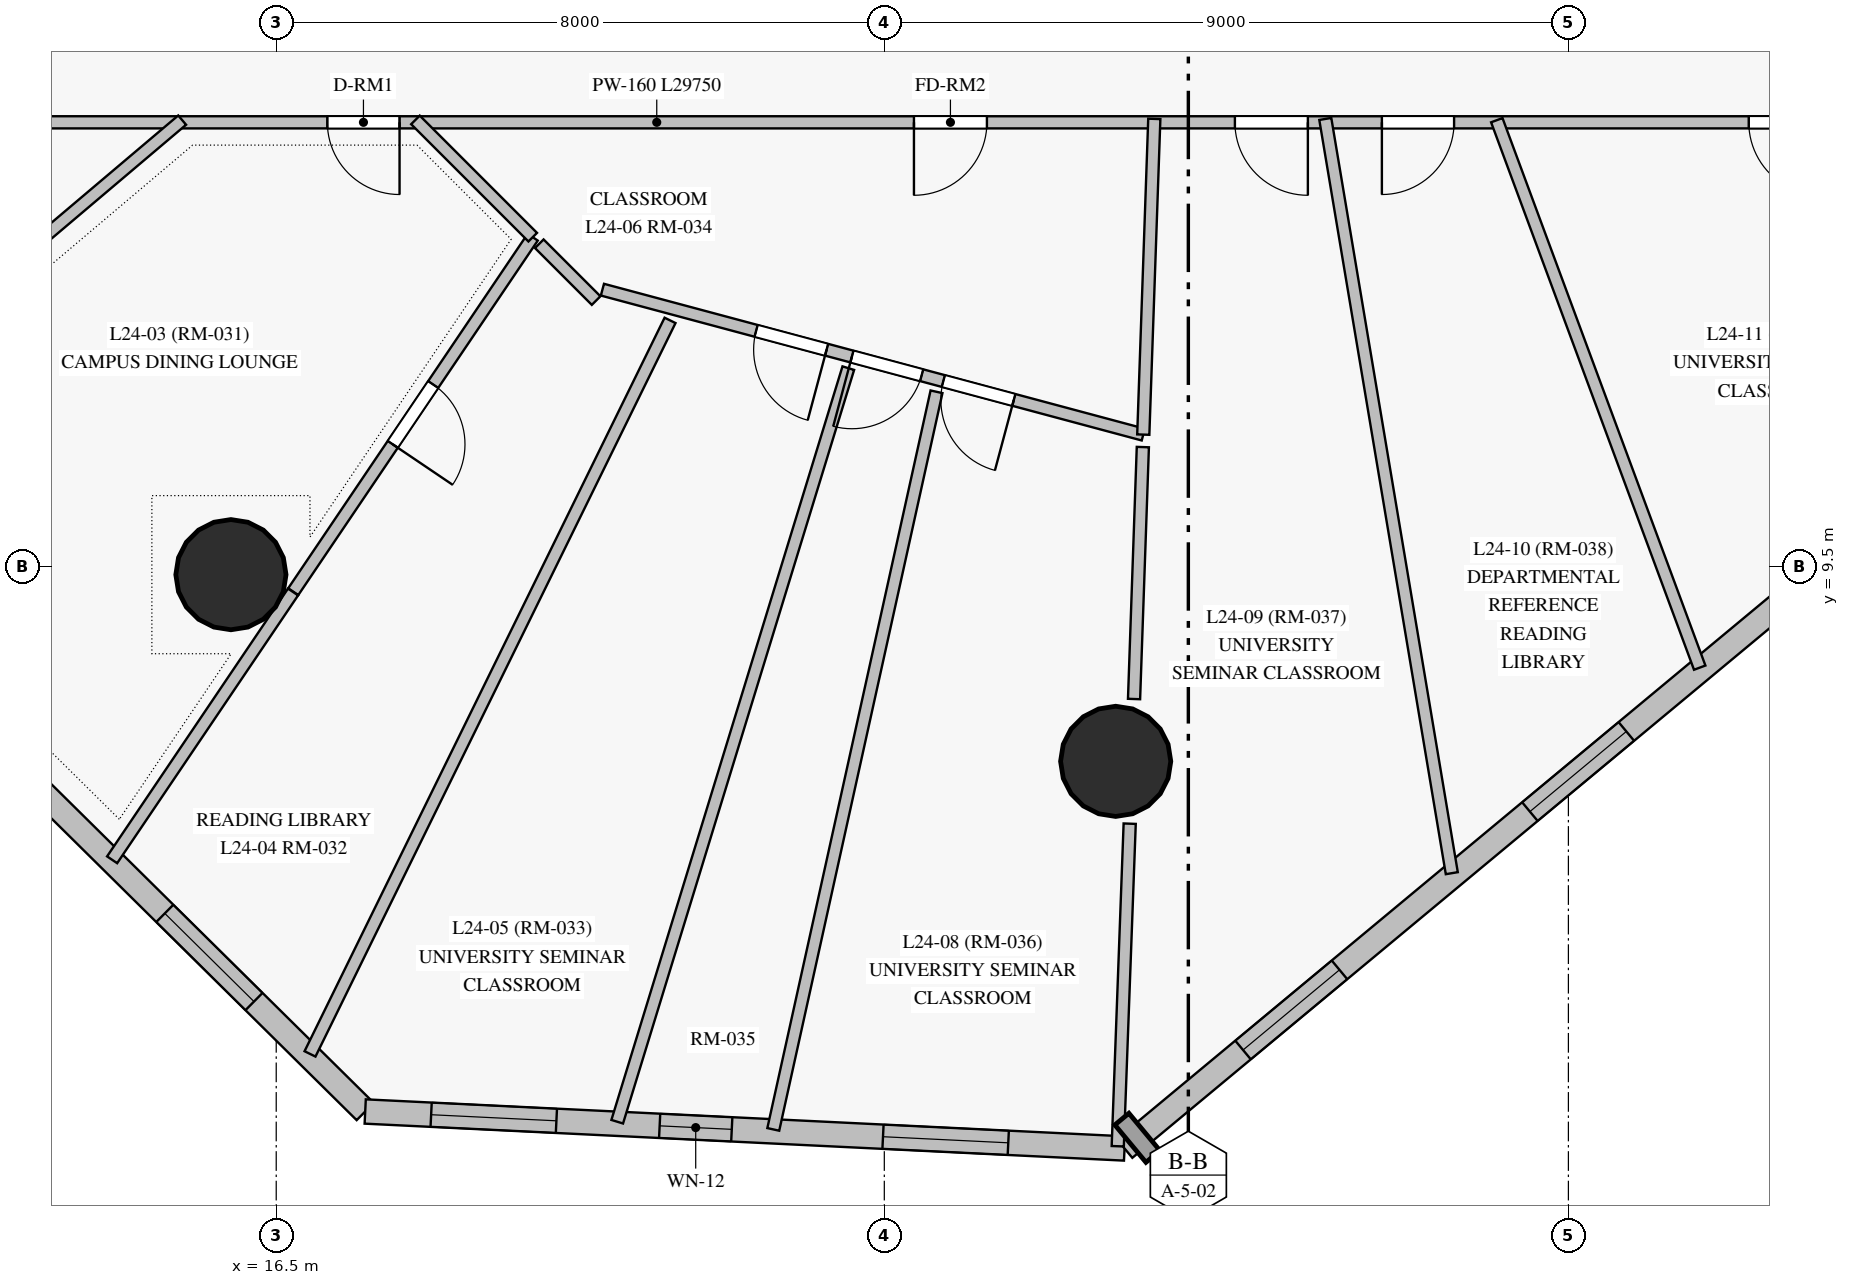
"""IFC4 building model, lengths in metres.
Left out: names, types, materials, properties, quantities, classifications, styles, units other than length and angle.
Written with IfcOpenShell. Run it as: python <this file> out.ifc"""

import sys

from ifc_helpers import new_model, si_unit, direction, frame, frame_2d, origin, origin_with_axes, origin_2d, place, context, subcontext, project, spatial, rectangle, circle, extrude, source, transform, mapped, element, fill, save


model = new_model("IFC4")
c1 = context("Model", 3, precision=1e-05, world=origin(), true_north=direction((0.0, 1.0)))
c2 = subcontext(c1, "Body", "Model", "MODEL_VIEW")
j1 = project(units=[si_unit("LENGTHUNIT", "METRE"), si_unit("PLANEANGLEUNIT", "RADIAN")], contexts=[c1])
p1 = place(None, origin())
s1 = spatial("IfcSite", under=j1, at=p1, CompositionType="ELEMENT")
p2 = place(p1, origin())
s2 = spatial("IfcBuilding", under=s1, at=p2, CompositionType="ELEMENT")
p3 = place(p2, frame((0.0, 0.0, 92.2)))
s3 = spatial("IfcBuildingStorey", under=s2, at=p3, CompositionType="ELEMENT", Elevation=92.2)
m1 = source(origin_with_axes(), c2, "Body", "SweptSolid", [
    extrude(circle(Radius=0.725, at=origin_2d()), origin(), (0.0, 0.0, 1.0), 4.0),
])
for number, where, z_axis, x_axis in (
    (1, (15.904, 9.399, 0.0), (0.0, 0.0, 1.0), (1.0, 0.0, 0.0)),
    (2, (27.544, 6.943, 0.0), (0.0, 0.0, 1.0), (1.0, 0.0, 0.0)),
):
    element("IfcColumn", number, at=place(p3, frame(where, z_axis=z_axis, x_axis=x_axis)), inside=s3, PredefinedType="COLUMN", context=c2, shape_type="MappedRepresentation", body=[
        mapped(m1, transform((0.0, 0.0, 0.0), scale=1.0)),
    ])
p4 = place(p3, frame((8.8, 11.106, 0.0), z_axis=(0.0, 0.0, 1.0), x_axis=(0.711166138023, -0.703023985459, 0.0)))
e3 = element("IfcWall", 3, at=p4, inside=s3, PredefinedType="SOLIDWALL", context=c2, shape_type="SweptSolid", body=[
    extrude(rectangle(XDim=12.474, YDim=0.32, at=frame_2d((6.237, 0.0))), origin(), (0.0, 0.0, 1.0), 3.775),
])
p5 = place(p4, frame((3.52, 0.0, 0.85)))
e4 = element("IfcOpeningElement", 4, at=p5, cuts=e3, PredefinedType="OPENING", context=c2, shape_type="SweptSolid", body=[
    extrude(rectangle(XDim=1.65, YDim=1.65, at=frame_2d((0.825, 0.825))), frame((0.0, 0.17, 0.0), z_axis=(0.0, -1.0, 0.0), x_axis=(1.0, 0.0, 0.0)), (0.0, 0.0, 1.0), 0.34),
])
p6 = place(p4, frame((8.766, 0.0, 0.85)))
e5 = element("IfcOpeningElement", 5, at=p6, cuts=e3, PredefinedType="OPENING", context=c2, shape_type="SweptSolid", body=[
    extrude(rectangle(XDim=1.65, YDim=1.65, at=frame_2d((0.825, 0.825))), frame((0.0, 0.17, 0.0), z_axis=(0.0, -1.0, 0.0), x_axis=(1.0, 0.0, 0.0)), (0.0, 0.0, 1.0), 0.34),
])
p7 = place(p3, frame((17.671, 2.336, 0.0), z_axis=(0.0, 0.0, 1.0), x_axis=(0.998817213459, -0.048622773441, 0.0)))
e6 = element("IfcWall", 6, at=p7, inside=s3, PredefinedType="SOLIDWALL", context=c2, shape_type="SweptSolid", body=[
    extrude(rectangle(XDim=10.002, YDim=0.32, at=frame_2d((5.001, 0.0))), origin(), (0.0, 0.0, 1.0), 3.775),
])
p8 = place(p7, frame((0.868, 0.0, 0.85)))
e7 = element("IfcOpeningElement", 7, at=p8, cuts=e6, PredefinedType="OPENING", context=c2, shape_type="SweptSolid", body=[
    extrude(rectangle(XDim=1.65, YDim=1.65, at=frame_2d((0.825, 0.825))), frame((0.0, 0.17, 0.0), z_axis=(0.0, -1.0, 0.0), x_axis=(1.0, 0.0, 0.0)), (0.0, 0.0, 1.0), 0.34),
])
p9 = place(p7, frame((3.878, 0.0, 0.85)))
e8 = element("IfcOpeningElement", 8, at=p9, cuts=e6, PredefinedType="OPENING", context=c2, shape_type="SweptSolid", body=[
    extrude(rectangle(XDim=0.95, YDim=1.5, at=frame_2d((0.475, 0.75))), frame((0.0, 0.17, 0.0), z_axis=(0.0, -1.0, 0.0), x_axis=(1.0, 0.0, 0.0)), (0.0, 0.0, 1.0), 0.34),
])
p10 = place(p7, frame((6.82, 0.0, 0.85)))
e9 = element("IfcOpeningElement", 9, at=p10, cuts=e6, PredefinedType="OPENING", context=c2, shape_type="SweptSolid", body=[
    extrude(rectangle(XDim=1.65, YDim=1.65, at=frame_2d((0.825, 0.825))), frame((0.0, 0.17, 0.0), z_axis=(0.0, -1.0, 0.0), x_axis=(1.0, 0.0, 0.0)), (0.0, 0.0, 1.0), 0.34),
])
p11 = place(p3, frame((27.661, 1.85, 0.0), z_axis=(0.0, 0.0, 1.0), x_axis=(0.769079412442, 0.639153234646, 0.0)))
e10 = element("IfcWall", 10, at=p11, inside=s3, PredefinedType="SOLIDWALL", context=c2, shape_type="SweptSolid", body=[
    extrude(rectangle(XDim=14.959, YDim=0.32, at=frame_2d((7.479, 0.0))), origin(), (0.0, 0.0, 1.0), 3.775),
])
p12 = place(p11, frame((2.027, 0.0, 0.85)))
e11 = element("IfcOpeningElement", 11, at=p12, cuts=e10, PredefinedType="OPENING", context=c2, shape_type="SweptSolid", body=[
    extrude(rectangle(XDim=1.65, YDim=1.65, at=frame_2d((0.825, 0.825))), frame((0.0, 0.17, 0.0), z_axis=(0.0, -1.0, 0.0), x_axis=(1.0, 0.0, 0.0)), (0.0, 0.0, 1.0), 0.34),
])
p13 = place(p11, frame((6.934, 0.0, 0.85)))
e12 = element("IfcOpeningElement", 12, at=p13, cuts=e10, PredefinedType="OPENING", context=c2, shape_type="SweptSolid", body=[
    extrude(rectangle(XDim=1.65, YDim=1.65, at=frame_2d((0.825, 0.825))), frame((0.0, 0.17, 0.0), z_axis=(0.0, -1.0, 0.0), x_axis=(1.0, 0.0, 0.0)), (0.0, 0.0, 1.0), 0.34),
])
p14 = place(p11, frame((11.562, 0.0, 0.85)))
e13 = element("IfcOpeningElement", 13, at=p14, cuts=e10, PredefinedType="OPENING", context=c2, shape_type="SweptSolid", body=[
    extrude(rectangle(XDim=1.65, YDim=1.65, at=frame_2d((0.825, 0.825))), frame((0.0, 0.17, 0.0), z_axis=(0.0, -1.0, 0.0), x_axis=(1.0, 0.0, 0.0)), (0.0, 0.0, 1.0), 0.34),
])
p15 = place(p3, frame((40.25, 15.35, 0.0), z_axis=(0.0, 0.0, 1.0), x_axis=(-1.0, 0.0, 0.0)))
e14 = element("IfcWall", 14, at=p15, inside=s3, PredefinedType="PARTITIONING", context=c2, shape_type="SweptSolid", body=[
    extrude(rectangle(XDim=29.75, YDim=0.16, at=frame_2d((14.875, 0.0))), origin(), (0.0, 0.0, 1.0), 2.975),
])
p16 = place(p15, frame((22.127, 0.0, 0.0)))
e15 = element("IfcOpeningElement", 15, at=p16, cuts=e14, PredefinedType="OPENING", context=c2, shape_type="SweptSolid", body=[
    extrude(rectangle(XDim=0.95, YDim=2.15, at=frame_2d((0.475, 1.075))), frame((0.0, 0.09, 0.0), z_axis=(0.0, -1.0, 0.0), x_axis=(1.0, 0.0, 0.0)), (0.0, 0.0, 1.0), 0.18),
])
p17 = place(p15, frame((14.4, 0.0, 0.0)))
e16 = element("IfcOpeningElement", 16, at=p17, cuts=e14, PredefinedType="OPENING", context=c2, shape_type="SweptSolid", body=[
    extrude(rectangle(XDim=0.96, YDim=2.15, at=frame_2d((0.48, 1.075))), frame((0.0, 0.09, 0.0), z_axis=(0.0, -1.0, 0.0), x_axis=(1.0, 0.0, 0.0)), (0.0, 0.0, 1.0), 0.18),
])
p18 = place(p15, frame((10.177, 0.0, 0.0)))
e17 = element("IfcOpeningElement", 17, at=p18, cuts=e14, PredefinedType="OPENING", context=c2, shape_type="SweptSolid", body=[
    extrude(rectangle(XDim=0.96, YDim=2.15, at=frame_2d((0.48, 1.075))), frame((0.0, 0.09, 0.0), z_axis=(0.0, -1.0, 0.0), x_axis=(1.0, 0.0, 0.0)), (0.0, 0.0, 1.0), 0.18),
])
p19 = place(p15, frame((8.254, 0.0, 0.0)))
e18 = element("IfcOpeningElement", 18, at=p19, cuts=e14, PredefinedType="OPENING", context=c2, shape_type="SweptSolid", body=[
    extrude(rectangle(XDim=0.95, YDim=2.15, at=frame_2d((0.475, 1.075))), frame((0.0, 0.09, 0.0), z_axis=(0.0, -1.0, 0.0), x_axis=(1.0, 0.0, 0.0)), (0.0, 0.0, 1.0), 0.18),
])
p20 = place(p15, frame((3.417, 0.0, 0.0)))
e19 = element("IfcOpeningElement", 19, at=p20, cuts=e14, PredefinedType="OPENING", context=c2, shape_type="SweptSolid", body=[
    extrude(rectangle(XDim=0.96, YDim=2.15, at=frame_2d((0.48, 1.075))), frame((0.0, 0.09, 0.0), z_axis=(0.0, -1.0, 0.0), x_axis=(1.0, 0.0, 0.0)), (0.0, 0.0, 1.0), 0.18),
])
p21 = place(p3, frame((21.681, 12.744, 0.0), z_axis=(0.0, 0.0, 1.0), x_axis=(-0.440615293115, -0.897696030666, 0.0)))
e20 = element("IfcWall", 20, at=p21, inside=s3, PredefinedType="PARTITIONING", context=c2, shape_type="SweptSolid", body=[
    extrude(rectangle(XDim=10.75, YDim=0.16, at=frame_2d((5.375, 0.0))), origin(), (0.0, 0.0, 1.0), 3.775),
])
p22 = place(p3, frame((24.026, 12.116, 0.0), z_axis=(0.0, 0.0, 1.0), x_axis=(-0.293187374814, -0.956055000117, 0.0)))
e21 = element("IfcWall", 21, at=p22, inside=s3, PredefinedType="PARTITIONING", context=c2, shape_type="SweptSolid", body=[
    extrude(rectangle(XDim=10.37, YDim=0.16, at=frame_2d((5.185, 0.0))), origin(), (0.0, 0.0, 1.0), 3.775),
])
p23 = place(p3, frame((30.302, 15.394, 0.0), z_axis=(0.0, 0.0, 1.0), x_axis=(0.165418051405, -0.986223538692, 0.0)))
e22 = element("IfcWall", 22, at=p23, inside=s3, PredefinedType="PARTITIONING", context=c2, shape_type="SweptSolid", body=[
    extrude(rectangle(XDim=10.061, YDim=0.16, at=frame_2d((5.031, 0.0))), origin(), (0.0, 0.0, 1.0), 3.775),
])
p24 = place(p3, frame((25.187, 11.805, 0.0), z_axis=(0.0, 0.0, 1.0), x_axis=(-0.216066868411, -0.976378568167, 0.0)))
e23 = element("IfcWall", 23, at=p24, inside=s3, PredefinedType="PARTITIONING", context=c2, shape_type="SweptSolid", body=[
    extrude(rectangle(XDim=9.939, YDim=0.16, at=frame_2d((4.969, 0.0))), origin(), (0.0, 0.0, 1.0), 3.775),
])
p25 = place(p3, frame((32.558, 15.378, 0.0), z_axis=(0.0, 0.0, 1.0), x_axis=(0.34752966717, -0.937668987669, 0.0)))
e24 = element("IfcWall", 24, at=p25, inside=s3, PredefinedType="PARTITIONING", context=c2, shape_type="SweptSolid", body=[
    extrude(rectangle(XDim=7.681, YDim=0.16, at=frame_2d((3.841, 0.0))), origin(), (0.0, 0.0, 1.0), 3.775),
])
p26 = place(p3, frame((15.262, 15.379, 0.0), z_axis=(0.0, 0.0, 1.0), x_axis=(-0.763431442255, -0.645888870454, 0.0)))
e25 = element("IfcWall", 25, at=p26, inside=s3, PredefinedType="PARTITIONING", context=c2, shape_type="SweptSolid", body=[
    extrude(rectangle(XDim=7.587, YDim=0.16, at=frame_2d((3.794, 0.0))), origin(), (0.0, 0.0, 1.0), 2.975),
])
p27 = place(p26, frame((4.054, 0.0, 0.0)))
e26 = element("IfcOpeningElement", 26, at=p27, cuts=e25, PredefinedType="OPENING", context=c2, shape_type="SweptSolid", body=[
    extrude(rectangle(XDim=0.86, YDim=2.04, at=frame_2d((0.43, 1.02))), frame((0.0, 0.09, 0.0), z_axis=(0.0, -1.0, 0.0), x_axis=(1.0, 0.0, 0.0)), (0.0, 0.0, 1.0), 0.18),
])
p28 = place(p3, frame((27.907, 11.242, 0.0), z_axis=(0.0, 0.0, 1.0), x_axis=(-0.965920682586, 0.258838240899, 0.0)))
e27 = element("IfcWall", 27, at=p28, inside=s3, PredefinedType="PARTITIONING", context=c2, shape_type="SweptSolid", body=[
    extrude(rectangle(XDim=7.366, YDim=0.16, at=frame_2d((3.683, 0.0))), origin(), (0.0, 0.0, 1.0), 3.275),
])
p29 = place(p28, frame((4.313, 0.0, 0.0)))
e28 = element("IfcOpeningElement", 28, at=p29, cuts=e27, PredefinedType="OPENING", context=c2, shape_type="SweptSolid", body=[
    extrude(rectangle(XDim=0.96, YDim=2.15, at=frame_2d((0.48, 1.075))), frame((0.0, 0.09, 0.0), z_axis=(0.0, -1.0, 0.0), x_axis=(1.0, 0.0, 0.0)), (0.0, 0.0, 1.0), 0.18),
])
p30 = place(p28, frame((3.018, 0.0, 0.0)))
e29 = element("IfcOpeningElement", 29, at=p30, cuts=e27, PredefinedType="OPENING", context=c2, shape_type="SweptSolid", body=[
    extrude(rectangle(XDim=0.95, YDim=2.15, at=frame_2d((0.475, 1.075))), frame((0.0, 0.09, 0.0), z_axis=(0.0, -1.0, 0.0), x_axis=(1.0, 0.0, 0.0)), (0.0, 0.0, 1.0), 0.18),
])
p31 = place(p28, frame((1.763, 0.0, 0.0)))
e30 = element("IfcOpeningElement", 30, at=p31, cuts=e27, PredefinedType="OPENING", context=c2, shape_type="SweptSolid", body=[
    extrude(rectangle(XDim=0.96, YDim=2.15, at=frame_2d((0.48, 1.075))), frame((0.0, 0.09, 0.0), z_axis=(0.0, -1.0, 0.0), x_axis=(1.0, 0.0, 0.0)), (0.0, 0.0, 1.0), 0.18),
])
p32 = place(p3, frame((19.875, 13.839, 0.0), z_axis=(0.0, 0.0, 1.0), x_axis=(-0.559775304188, -0.82864444053, 0.0)))
e31 = element("IfcWall", 31, at=p32, inside=s3, PredefinedType="PARTITIONING", context=c2, shape_type="SweptSolid", body=[
    extrude(rectangle(XDim=5.628, YDim=0.16, at=frame_2d((2.814, 0.0))), origin(), (0.0, 0.0, 1.0), 3.775),
])
p33 = place(p32, frame((2.339, 0.0, 0.0)))
e32 = element("IfcOpeningElement", 32, at=p33, cuts=e31, PredefinedType="OPENING", context=c2, shape_type="SweptSolid", body=[
    extrude(rectangle(XDim=0.95, YDim=2.15, at=frame_2d((0.475, 1.075))), frame((0.0, 0.09, 0.0), z_axis=(0.0, -1.0, 0.0), x_axis=(1.0, 0.0, 0.0)), (0.0, 0.0, 1.0), 0.18),
])
p34 = place(p3, frame((27.728, 6.123, 0.0), z_axis=(0.0, 0.0, 1.0), x_axis=(-0.03696700615, -0.999316486633, 0.0)))
e33 = element("IfcWall", 33, at=p34, inside=s3, PredefinedType="PARTITIONING", context=c2, shape_type="SweptSolid", body=[
    extrude(rectangle(XDim=4.247, YDim=0.16, at=frame_2d((2.123, 0.0))), origin(), (0.0, 0.0, 1.0), 3.775),
])
p35 = place(p3, frame((28.052, 15.395, 0.0), z_axis=(0.0, 0.0, 1.0), x_axis=(-0.034895264462, -0.999390974803, 0.0)))
e34 = element("IfcWall", 34, at=p35, inside=s3, PredefinedType="PARTITIONING", context=c2, shape_type="SweptSolid", body=[
    extrude(rectangle(XDim=4.156, YDim=0.16, at=frame_2d((2.078, 0.0))), origin(), (0.0, 0.0, 1.0), 3.775),
])
p36 = place(p3, frame((16.721, 9.171, 0.0), z_axis=(0.0, 0.0, 1.0), x_axis=(-0.559791350137, -0.828633600762, 0.0)))
e35 = element("IfcWall", 35, at=p36, inside=s3, PredefinedType="PARTITIONING", context=c2, shape_type="SweptSolid", body=[
    extrude(rectangle(XDim=4.252, YDim=0.16, at=frame_2d((2.126, 0.0))), origin(), (0.0, 0.0, 1.0), 3.775),
])
p37 = place(p3, frame((27.901, 11.078, 0.0), z_axis=(0.0, 0.0, 1.0), x_axis=(-0.034890726755, -0.999391133234, 0.0)))
e36 = element("IfcWall", 36, at=p37, inside=s3, PredefinedType="PARTITIONING", context=c2, shape_type="SweptSolid", body=[
    extrude(rectangle(XDim=3.317, YDim=0.16, at=frame_2d((1.658, 0.0))), origin(), (0.0, 0.0, 1.0), 2.975),
])
p38 = place(p3, frame((18.332, 15.382, 0.0), z_axis=(0.0, 0.0, 1.0), x_axis=(0.707050832555, -0.707162725391, 0.0)))
e37 = element("IfcWall", 37, at=p38, inside=s3, PredefinedType="PARTITIONING", context=c2, shape_type="SweptSolid", body=[
    extrude(rectangle(XDim=2.182, YDim=0.16, at=frame_2d((1.091, 0.0))), origin(), (0.0, 0.0, 1.0), 3.275),
])
p39 = place(p3, frame((19.961, 13.752, 0.0), z_axis=(0.0, 0.0, 1.0), x_axis=(0.707106781187, -0.707106781187, 0.0)))
e38 = element("IfcWall", 38, at=p39, inside=s3, PredefinedType="PARTITIONING", context=c2, shape_type="SweptSolid", body=[
    extrude(rectangle(XDim=1.057, YDim=0.16, at=frame_2d((0.529, 0.0))), origin(), (0.0, 0.0, 1.0), 3.275),
])
m2 = source(origin_with_axes(), c2, "Body", "SweptSolid", [
    extrude(rectangle(XDim=1.65, YDim=1.65, at=frame_2d((0.825, 0.825))), frame((0.0, 0.03, 0.0), z_axis=(0.0, -1.0, 0.0), x_axis=(1.0, 0.0, 0.0)), (0.0, 0.0, 1.0), 0.06),
])
p40 = place(p6, origin())
e39 = element("IfcWindow", 39, at=p40, inside=s3, PartitioningType="SINGLE_PANEL", PredefinedType="WINDOW", context=c2, shape_type="MappedRepresentation", body=[
    mapped(m2, transform((0.0, 0.0, 0.0), scale=1.0)),
])
fill(e5, e39)
p41 = place(p8, origin())
e40 = element("IfcWindow", 40, at=p41, inside=s3, PartitioningType="SINGLE_PANEL", PredefinedType="WINDOW", context=c2, shape_type="MappedRepresentation", body=[
    mapped(m2, transform((0.0, 0.0, 0.0), scale=1.0)),
])
fill(e7, e40)
m3 = source(origin_with_axes(), c2, "Body", "SweptSolid", [
    extrude(rectangle(XDim=0.95, YDim=1.5, at=frame_2d((0.475, 0.75))), frame((0.0, 0.03, 0.0), z_axis=(0.0, -1.0, 0.0), x_axis=(1.0, 0.0, 0.0)), (0.0, 0.0, 1.0), 0.06),
])
p42 = place(p9, origin())
e41 = element("IfcWindow", 41, at=p42, inside=s3, PartitioningType="SINGLE_PANEL", PredefinedType="WINDOW", context=c2, shape_type="MappedRepresentation", body=[
    mapped(m3, transform((0.0, 0.0, 0.0), scale=1.0)),
])
fill(e8, e41)
p43 = place(p10, origin())
e42 = element("IfcWindow", 42, at=p43, inside=s3, PartitioningType="SINGLE_PANEL", PredefinedType="WINDOW", context=c2, shape_type="MappedRepresentation", body=[
    mapped(m2, transform((0.0, 0.0, 0.0), scale=1.0)),
])
fill(e9, e42)
p44 = place(p12, origin())
e43 = element("IfcWindow", 43, at=p44, inside=s3, PartitioningType="SINGLE_PANEL", PredefinedType="WINDOW", context=c2, shape_type="MappedRepresentation", body=[
    mapped(m2, transform((0.0, 0.0, 0.0), scale=1.0)),
])
fill(e11, e43)
p45 = place(p13, origin())
e44 = element("IfcWindow", 44, at=p45, inside=s3, PartitioningType="SINGLE_PANEL", PredefinedType="WINDOW", context=c2, shape_type="MappedRepresentation", body=[
    mapped(m2, transform((0.0, 0.0, 0.0), scale=1.0)),
])
fill(e12, e44)
m4 = source(origin_with_axes(), c2, "Body", "SweptSolid", [
    extrude(rectangle(XDim=0.95, YDim=2.15, at=frame_2d((0.475, 1.075))), frame((0.0, 0.025, 0.0), z_axis=(0.0, -1.0, 0.0), x_axis=(1.0, 0.0, 0.0)), (0.0, 0.0, 1.0), 0.05),
])
p46 = place(p16, origin())
e45 = element("IfcDoor", 45, at=p46, inside=s3, OperationType="SINGLE_SWING_LEFT", PredefinedType="DOOR", context=c2, shape_type="MappedRepresentation", body=[
    mapped(m4, transform((0.0, 0.0, 0.0), scale=1.0)),
])
fill(e15, e45)
m5 = source(origin_with_axes(), c2, "Body", "SweptSolid", [
    extrude(rectangle(XDim=0.96, YDim=2.15, at=frame_2d((0.48, 1.075))), frame((0.0, 0.025, 0.0), z_axis=(0.0, -1.0, 0.0), x_axis=(1.0, 0.0, 0.0)), (0.0, 0.0, 1.0), 0.05),
])
p47 = place(p17, origin())
e46 = element("IfcDoor", 46, at=p47, inside=s3, OperationType="SINGLE_SWING_RIGHT", PredefinedType="DOOR", context=c2, shape_type="MappedRepresentation", body=[
    mapped(m5, transform((0.0, 0.0, 0.0), scale=1.0)),
])
fill(e16, e46)
p48 = place(p18, origin())
e47 = element("IfcDoor", 47, at=p48, inside=s3, OperationType="SINGLE_SWING_LEFT", PredefinedType="DOOR", context=c2, shape_type="MappedRepresentation", body=[
    mapped(m5, transform((0.0, 0.0, 0.0), scale=1.0)),
])
fill(e17, e47)
p49 = place(p19, origin())
e48 = element("IfcDoor", 48, at=p49, inside=s3, OperationType="SINGLE_SWING_RIGHT", PredefinedType="DOOR", context=c2, shape_type="MappedRepresentation", body=[
    mapped(m4, transform((0.0, 0.0, 0.0), scale=1.0)),
])
fill(e18, e48)
p50 = place(p20, origin())
e49 = element("IfcDoor", 49, at=p50, inside=s3, OperationType="SINGLE_SWING_LEFT", PredefinedType="DOOR", context=c2, shape_type="MappedRepresentation", body=[
    mapped(m5, transform((0.0, 0.0, 0.0), scale=1.0)),
])
fill(e19, e49)
p51 = place(p33, origin())
e50 = element("IfcDoor", 50, at=p51, inside=s3, OperationType="SINGLE_SWING_RIGHT", PredefinedType="DOOR", context=c2, shape_type="MappedRepresentation", body=[
    mapped(m4, transform((0.0, 0.0, 0.0), scale=1.0)),
])
fill(e32, e50)
p52 = place(p29, origin())
e51 = element("IfcDoor", 51, at=p52, inside=s3, OperationType="SINGLE_SWING_LEFT", PredefinedType="DOOR", context=c2, shape_type="MappedRepresentation", body=[
    mapped(m5, transform((0.0, 0.0, 0.0), scale=1.0)),
])
fill(e28, e51)
p53 = place(p30, origin())
e52 = element("IfcDoor", 52, at=p53, inside=s3, OperationType="SINGLE_SWING_RIGHT", PredefinedType="DOOR", context=c2, shape_type="MappedRepresentation", body=[
    mapped(m4, transform((0.0, 0.0, 0.0), scale=1.0)),
])
fill(e29, e52)
p54 = place(p31, origin())
e53 = element("IfcDoor", 53, at=p54, inside=s3, OperationType="SINGLE_SWING_LEFT", PredefinedType="DOOR", context=c2, shape_type="MappedRepresentation", body=[
    mapped(m5, transform((0.0, 0.0, 0.0), scale=1.0)),
])
fill(e30, e53)
save(model, sys.argv[1])
